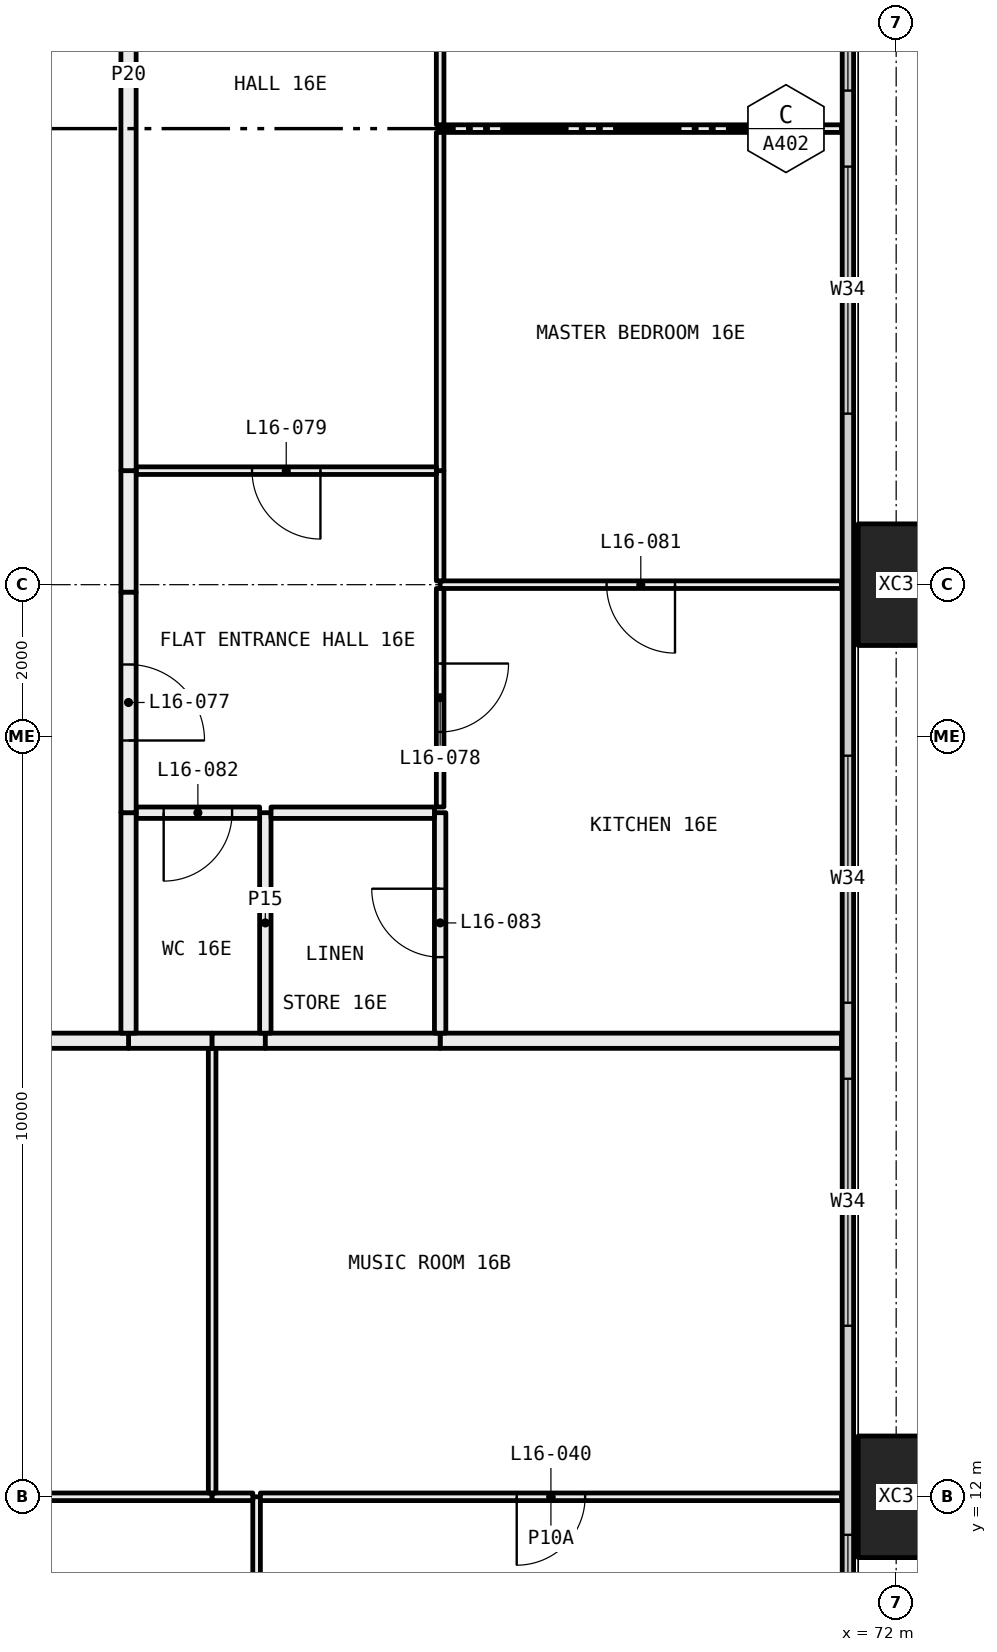
"""IFC4 building model, lengths in metres.
Left out: names, types, materials, properties, quantities, classifications, styles, units other than length and angle.
Written with IfcOpenShell. Run it as: python <this file> out.ifc"""

import sys

from ifc_helpers import new_model, si_unit, direction, frame, frame_2d, origin, origin_2d, place, context, subcontext, project, spatial, rectangle, hollow_rectangle, extrude, element, fill, save


model = new_model("IFC4")
c1 = context("Model", 3, precision=1e-05, world=origin(), true_north=direction((0.0, 1.0)))
c2 = subcontext(c1, "Body", "Model", "MODEL_VIEW")
j1 = project(units=[si_unit("LENGTHUNIT", "METRE"), si_unit("PLANEANGLEUNIT", "RADIAN")], contexts=[c1])
p1 = place(None, origin())
s1 = spatial("IfcSite", under=j1, at=p1, CompositionType="ELEMENT")
p2 = place(p1, origin())
s2 = spatial("IfcBuilding", under=s1, at=p2, CompositionType="ELEMENT")
p3 = place(p2, frame((0.0, 0.0, 67.95)))
s3 = spatial("IfcBuildingStorey", under=s2, at=p3, CompositionType="ELEMENT", Elevation=67.95)
for number, where, z_axis, x_axis in (
    (1, (72.0, 12.0, -0.4), (0.0, 0.0, 1.0), (0.0, 1.0, 0.0)),
    (2, (72.0, 24.0, -0.4), (0.0, 0.0, 1.0), (0.0, 1.0, 0.0)),
):
    element("IfcColumn", number, at=place(p3, frame(where, z_axis=z_axis, x_axis=x_axis)), inside=s3, PredefinedType="COLUMN", context=c2, shape_type="SweptSolid", body=[
        extrude(hollow_rectangle(XDim=1.6, YDim=1.0, WallThickness=0.065, at=origin_2d()), origin(), (0.0, 0.0, 1.0), 3.45),
    ])
p4 = place(p3, frame((71.365, 6.71, 0.0), z_axis=(0.0, 0.0, 1.0), x_axis=(0.0, 1.0, 0.0)))
e3 = element("IfcWall", 3, at=p4, inside=s3, PredefinedType="ELEMENTEDWALL", context=c2, shape_type="SweptSolid", body=[
    extrude(rectangle(XDim=34.58, YDim=0.15, at=frame_2d((17.29, 0.0))), origin(), (0.0, 0.0, 1.0), 3.05),
])
p5 = place(p4, frame((0.29, 0.0, 0.45)))
e4 = element("IfcOpeningElement", 4, at=p5, cuts=e3, PredefinedType="OPENING", context=c2, shape_type="SweptSolid", body=[
    extrude(rectangle(XDim=4.5, YDim=2.55, at=frame_2d((2.25, 1.275))), frame((0.0, 0.085, 0.0), z_axis=(0.0, -1.0, 0.0), x_axis=(1.0, 0.0, 0.0)), (0.0, 0.0, 1.0), 0.17),
])
p6 = place(p4, frame((7.54, 0.0, 0.45)))
e5 = element("IfcOpeningElement", 5, at=p6, cuts=e3, PredefinedType="OPENING", context=c2, shape_type="SweptSolid", body=[
    extrude(rectangle(XDim=3.25, YDim=2.55, at=frame_2d((1.625, 1.275))), frame((0.0, 0.085, 0.0), z_axis=(0.0, -1.0, 0.0), x_axis=(1.0, 0.0, 0.0)), (0.0, 0.0, 1.0), 0.17),
])
p7 = place(p4, frame((11.79, 0.0, 0.45)))
e6 = element("IfcOpeningElement", 6, at=p7, cuts=e3, PredefinedType="OPENING", context=c2, shape_type="SweptSolid", body=[
    extrude(rectangle(XDim=3.25, YDim=2.55, at=frame_2d((1.625, 1.275))), frame((0.0, 0.085, 0.0), z_axis=(0.0, -1.0, 0.0), x_axis=(1.0, 0.0, 0.0)), (0.0, 0.0, 1.0), 0.17),
])
p8 = place(p4, frame((19.54, 0.0, 0.45)))
e7 = element("IfcOpeningElement", 7, at=p8, cuts=e3, PredefinedType="OPENING", context=c2, shape_type="SweptSolid", body=[
    extrude(rectangle(XDim=3.25, YDim=2.55, at=frame_2d((1.625, 1.275))), frame((0.0, 0.085, 0.0), z_axis=(0.0, -1.0, 0.0), x_axis=(1.0, 0.0, 0.0)), (0.0, 0.0, 1.0), 0.17),
])
p9 = place(p4, frame((23.79, 0.0, 0.45)))
e8 = element("IfcOpeningElement", 8, at=p9, cuts=e3, PredefinedType="OPENING", context=c2, shape_type="SweptSolid", body=[
    extrude(rectangle(XDim=2.0, YDim=2.55, at=frame_2d((1.0, 1.275))), frame((0.0, 0.085, 0.0), z_axis=(0.0, -1.0, 0.0), x_axis=(1.0, 0.0, 0.0)), (0.0, 0.0, 1.0), 0.17),
])
p10 = place(p4, frame((29.79, 0.0, 0.45)))
e9 = element("IfcOpeningElement", 9, at=p10, cuts=e3, PredefinedType="OPENING", context=c2, shape_type="SweptSolid", body=[
    extrude(rectangle(XDim=4.5, YDim=2.55, at=frame_2d((2.25, 1.275))), frame((0.0, 0.085, 0.0), z_axis=(0.0, -1.0, 0.0), x_axis=(1.0, 0.0, 0.0)), (0.0, 0.0, 1.0), 0.17),
])
p11 = place(p3, frame((63.585, 6.05, 0.0), z_axis=(0.0, 0.0, 1.0), x_axis=(0.0, 1.0, 0.0)))
e10 = element("IfcWall", 10, at=p11, inside=s3, PredefinedType="PARTITIONING", context=c2, shape_type="SweptSolid", body=[
    extrude(rectangle(XDim=5.95, YDim=0.1, at=frame_2d((2.975, 0.0))), origin(), (0.0, 0.0, 1.0), 2.45),
])
p12 = place(p11, frame((2.525, 0.0, 0.0)))
e11 = element("IfcOpeningElement", 11, at=p12, cuts=e10, PredefinedType="OPENING", context=c2, shape_type="SweptSolid", body=[
    extrude(rectangle(XDim=0.9, YDim=2.1, at=frame_2d((0.45, 1.05))), frame((0.0, 0.06, 0.0), z_axis=(0.0, -1.0, 0.0), x_axis=(1.0, 0.0, 0.0)), (0.0, 0.0, 1.0), 0.12),
])
p13 = place(p3, frame((63.0, 12.0, 0.0), z_axis=(0.0, 0.0, 1.0), x_axis=(-1.0, 0.0, 0.0)))
e12 = element("IfcWall", 12, at=p13, inside=s3, PredefinedType="PARTITIONING", context=c2, shape_type="SweptSolid", body=[
    extrude(rectangle(XDim=2.2, YDim=0.1, at=frame_2d((1.1, 0.0))), origin(), (0.0, 0.0, 1.0), 2.45),
])
p14 = place(p3, frame((63.535, 12.0, 0.0), z_axis=(0.0, 0.0, 1.0), x_axis=(-1.0, 0.0, 0.0)))
e13 = element("IfcWall", 13, at=p14, inside=s3, PredefinedType="PARTITIONING", context=c2, shape_type="SweptSolid", body=[
    extrude(rectangle(XDim=0.535, YDim=0.1, at=frame_2d((0.268, 0.0))), origin(), (0.0, 0.0, 1.0), 2.45),
])
p15 = place(p3, frame((71.28, 12.0, 0.0), z_axis=(0.0, 0.0, 1.0), x_axis=(-1.0, 0.0, 0.0)))
e14 = element("IfcWall", 14, at=p15, inside=s3, PredefinedType="PARTITIONING", context=c2, shape_type="SweptSolid", body=[
    extrude(rectangle(XDim=7.645, YDim=0.1, at=frame_2d((3.823, 0.0))), origin(), (0.0, 0.0, 1.0), 2.45),
])
p16 = place(p15, frame((3.373, 0.0, 0.0)))
e15 = element("IfcOpeningElement", 15, at=p16, cuts=e14, PredefinedType="OPENING", context=c2, shape_type="SweptSolid", body=[
    extrude(rectangle(XDim=0.9, YDim=2.1, at=frame_2d((0.45, 1.05))), frame((0.0, 0.06, 0.0), z_axis=(0.0, -1.0, 0.0), x_axis=(1.0, 0.0, 0.0)), (0.0, 0.0, 1.0), 0.12),
])
p17 = place(p3, frame((63.0, 12.05, 0.0), z_axis=(0.0, 0.0, 1.0), x_axis=(0.0, 1.0, 0.0)))
e16 = element("IfcWall", 16, at=p17, inside=s3, PredefinedType="PARTITIONING", context=c2, shape_type="SweptSolid", body=[
    extrude(rectangle(XDim=5.85, YDim=0.1, at=frame_2d((2.925, 0.0))), origin(), (0.0, 0.0, 1.0), 2.45),
])
p18 = place(p3, frame((63.0, 18.0, 0.0), z_axis=(0.0, 0.0, 1.0), x_axis=(-1.0, 0.0, 0.0)))
e17 = element("IfcWall", 17, at=p18, inside=s3, PredefinedType="PARTITIONING", context=c2, shape_type="SweptSolid", body=[
    extrude(rectangle(XDim=1.1, YDim=0.2, at=frame_2d((0.55, 0.0))), origin(), (0.0, 0.0, 1.0), 3.05),
])
p19 = place(p3, frame((61.9, 18.0, 0.0), z_axis=(0.0, 0.0, 1.0), x_axis=(-1.0, 0.0, 0.0)))
e18 = element("IfcWall", 18, at=p19, inside=s3, PredefinedType="PARTITIONING", context=c2, shape_type="SweptSolid", body=[
    extrude(rectangle(XDim=7.9, YDim=0.2, at=frame_2d((3.95, 0.0))), origin(), (0.0, 0.0, 1.0), 3.05),
])
p20 = place(p3, frame((71.28, 18.0, 0.0), z_axis=(0.0, 0.0, 1.0), x_axis=(-1.0, 0.0, 0.0)))
e19 = element("IfcWall", 19, at=p20, inside=s3, PredefinedType="PARTITIONING", context=c2, shape_type="SweptSolid", body=[
    extrude(rectangle(XDim=5.28, YDim=0.2, at=frame_2d((2.64, 0.0))), origin(), (0.0, 0.0, 1.0), 3.05),
])
p21 = place(p3, frame((63.7, 18.0, 0.0), z_axis=(0.0, 0.0, 1.0), x_axis=(-1.0, 0.0, 0.0)))
e20 = element("IfcWall", 20, at=p21, inside=s3, PredefinedType="PARTITIONING", context=c2, shape_type="SweptSolid", body=[
    extrude(rectangle(XDim=0.7, YDim=0.2, at=frame_2d((0.35, 0.0))), origin(), (0.0, 0.0, 1.0), 3.05),
])
p22 = place(p3, frame((66.0, 18.0, 0.0), z_axis=(0.0, 0.0, 1.0), x_axis=(-1.0, 0.0, 0.0)))
e21 = element("IfcWall", 21, at=p22, inside=s3, PredefinedType="PARTITIONING", context=c2, shape_type="SweptSolid", body=[
    extrude(rectangle(XDim=2.3, YDim=0.2, at=frame_2d((1.15, 0.0))), origin(), (0.0, 0.0, 1.0), 3.05),
])
p23 = place(p3, frame((71.28, 24.0, 0.0), z_axis=(0.0, 0.0, 1.0), x_axis=(-1.0, 0.0, 0.0)))
e22 = element("IfcWall", 22, at=p23, inside=s3, PredefinedType="PARTITIONING", context=c2, shape_type="SweptSolid", body=[
    extrude(rectangle(XDim=5.28, YDim=0.1, at=frame_2d((2.64, 0.0))), origin(), (0.0, 0.0, 1.0), 2.45),
])
p24 = place(p23, frame((2.19, 0.0, 0.0)))
e23 = element("IfcOpeningElement", 23, at=p24, cuts=e22, PredefinedType="OPENING", context=c2, shape_type="SweptSolid", body=[
    extrude(rectangle(XDim=0.9, YDim=2.1, at=frame_2d((0.45, 1.05))), frame((0.0, 0.06, 0.0), z_axis=(0.0, -1.0, 0.0), x_axis=(1.0, 0.0, 0.0)), (0.0, 0.0, 1.0), 0.12),
])
p25 = place(p3, frame((66.0, 21.0, 0.0), z_axis=(0.0, 0.0, 1.0), x_axis=(0.0, -1.0, 0.0)))
e24 = element("IfcWall", 24, at=p25, inside=s3, PredefinedType="PARTITIONING", context=c2, shape_type="SweptSolid", body=[
    extrude(rectangle(XDim=2.9, YDim=0.15, at=frame_2d((1.45, 0.0))), origin(), (0.0, 0.0, 1.0), 3.05),
])
p26 = place(p25, frame((1.0, 0.0, 0.0)))
e25 = element("IfcOpeningElement", 25, at=p26, cuts=e24, PredefinedType="OPENING", context=c2, shape_type="SweptSolid", body=[
    extrude(rectangle(XDim=0.9, YDim=2.1, at=frame_2d((0.45, 1.05))), frame((0.0, 0.085, 0.0), z_axis=(0.0, -1.0, 0.0), x_axis=(1.0, 0.0, 0.0)), (0.0, 0.0, 1.0), 0.17),
])
p27 = place(p3, frame((66.0, 23.95, 0.0), z_axis=(0.0, 0.0, 1.0), x_axis=(0.0, -1.0, 0.0)))
e26 = element("IfcWall", 26, at=p27, inside=s3, PredefinedType="PARTITIONING", context=c2, shape_type="SweptSolid", body=[
    extrude(rectangle(XDim=2.875, YDim=0.1, at=frame_2d((1.438, 0.0))), origin(), (0.0, 0.0, 1.0), 2.45),
])
p28 = place(p27, frame((0.988, 0.0, 0.0)))
e27 = element("IfcOpeningElement", 27, at=p28, cuts=e26, PredefinedType="OPENING", context=c2, shape_type="SweptSolid", body=[
    extrude(rectangle(XDim=0.9, YDim=2.1, at=frame_2d((0.45, 1.05))), frame((0.0, 0.06, 0.0), z_axis=(0.0, -1.0, 0.0), x_axis=(1.0, 0.0, 0.0)), (0.0, 0.0, 1.0), 0.12),
])
p29 = place(p3, frame((71.28, 30.0, 0.0), z_axis=(0.0, 0.0, 1.0), x_axis=(-1.0, 0.0, 0.0)))
e28 = element("IfcWall", 28, at=p29, inside=s3, PredefinedType="PARTITIONING", context=c2, shape_type="SweptSolid", body=[
    extrude(rectangle(XDim=5.28, YDim=0.1, at=frame_2d((2.64, 0.0))), origin(), (0.0, 0.0, 1.0), 3.05),
])
p30 = place(p3, frame((66.0, 25.5, 0.0), z_axis=(0.0, 0.0, 1.0), x_axis=(0.0, -1.0, 0.0)))
e29 = element("IfcWall", 29, at=p30, inside=s3, PredefinedType="PARTITIONING", context=c2, shape_type="SweptSolid", body=[
    extrude(rectangle(XDim=1.45, YDim=0.1, at=frame_2d((0.725, 0.0))), origin(), (0.0, 0.0, 1.0), 2.45),
])
p31 = place(p3, frame((66.0, 29.95, 0.0), z_axis=(0.0, 0.0, 1.0), x_axis=(0.0, -1.0, 0.0)))
e30 = element("IfcWall", 30, at=p31, inside=s3, PredefinedType="PARTITIONING", context=c2, shape_type="SweptSolid", body=[
    extrude(rectangle(XDim=4.45, YDim=0.1, at=frame_2d((2.225, 0.0))), origin(), (0.0, 0.0, 1.0), 3.05),
])
p32 = place(p3, frame((66.0, 35.9, 0.0), z_axis=(0.0, 0.0, 1.0), x_axis=(0.0, -1.0, 0.0)))
e31 = element("IfcWall", 31, at=p32, inside=s3, PredefinedType="PARTITIONING", context=c2, shape_type="SweptSolid", body=[
    extrude(rectangle(XDim=5.85, YDim=0.1, at=frame_2d((2.925, 0.0))), origin(), (0.0, 0.0, 1.0), 3.05),
])
p33 = place(p32, frame((2.475, 0.0, 0.0)))
e32 = element("IfcOpeningElement", 32, at=p33, cuts=e31, PredefinedType="OPENING", context=c2, shape_type="SweptSolid", body=[
    extrude(rectangle(XDim=0.9, YDim=2.1, at=frame_2d((0.45, 1.05))), frame((0.0, 0.06, 0.0), z_axis=(0.0, -1.0, 0.0), x_axis=(1.0, 0.0, 0.0)), (0.0, 0.0, 1.0), 0.12),
])
p34 = place(p3, frame((63.7, 18.1, 0.0), z_axis=(0.0, 0.0, 1.0), x_axis=(0.0, 1.0, 0.0)))
e33 = element("IfcWall", 33, at=p34, inside=s3, PredefinedType="PARTITIONING", context=c2, shape_type="SweptSolid", body=[
    extrude(rectangle(XDim=2.9, YDim=0.15, at=frame_2d((1.45, 0.0))), origin(), (0.0, 0.0, 1.0), 3.05),
])
p35 = place(p3, frame((63.625, 21.0, 0.0), z_axis=(0.0, 0.0, 1.0), x_axis=(-1.0, 0.0, 0.0)))
e34 = element("IfcWall", 34, at=p35, inside=s3, PredefinedType="PARTITIONING", context=c2, shape_type="SweptSolid", body=[
    extrude(rectangle(XDim=1.625, YDim=0.15, at=frame_2d((0.812, 0.0))), origin(), (0.0, 0.0, 1.0), 3.05),
])
p36 = place(p35, frame((0.363, 0.0, 0.0)))
e35 = element("IfcOpeningElement", 35, at=p36, cuts=e34, PredefinedType="OPENING", context=c2, shape_type="SweptSolid", body=[
    extrude(rectangle(XDim=0.9, YDim=2.1, at=frame_2d((0.45, 1.05))), frame((0.0, 0.085, 0.0), z_axis=(0.0, -1.0, 0.0), x_axis=(1.0, 0.0, 0.0)), (0.0, 0.0, 1.0), 0.17),
])
p37 = place(p3, frame((61.9, 21.0, 0.0), z_axis=(0.0, 0.0, 1.0), x_axis=(0.0, -1.0, 0.0)))
e36 = element("IfcWall", 36, at=p37, inside=s3, PredefinedType="PARTITIONING", context=c2, shape_type="SweptSolid", body=[
    extrude(rectangle(XDim=2.9, YDim=0.2, at=frame_2d((1.45, 0.0))), origin(), (0.0, 0.0, 1.0), 3.05),
])
p38 = place(p3, frame((65.925, 21.0, 0.0), z_axis=(0.0, 0.0, 1.0), x_axis=(-1.0, 0.0, 0.0)))
e37 = element("IfcWall", 37, at=p38, inside=s3, PredefinedType="PARTITIONING", context=c2, shape_type="SweptSolid", body=[
    extrude(rectangle(XDim=2.15, YDim=0.15, at=frame_2d((1.075, 0.0))), origin(), (0.0, 0.0, 1.0), 3.05),
])
p39 = place(p3, frame((65.95, 25.5, 0.0), z_axis=(0.0, 0.0, 1.0), x_axis=(-1.0, 0.0, 0.0)))
e38 = element("IfcWall", 38, at=p39, inside=s3, PredefinedType="PARTITIONING", context=c2, shape_type="SweptSolid", body=[
    extrude(rectangle(XDim=3.95, YDim=0.1, at=frame_2d((1.975, 0.0))), origin(), (0.0, 0.0, 1.0), 3.05),
])
p40 = place(p39, frame((1.525, 0.0, 0.0)))
e39 = element("IfcOpeningElement", 39, at=p40, cuts=e38, PredefinedType="OPENING", context=c2, shape_type="SweptSolid", body=[
    extrude(rectangle(XDim=0.9, YDim=2.1, at=frame_2d((0.45, 1.05))), frame((0.0, 0.06, 0.0), z_axis=(0.0, -1.0, 0.0), x_axis=(1.0, 0.0, 0.0)), (0.0, 0.0, 1.0), 0.12),
])
p41 = place(p3, frame((61.9, 25.5, 0.0), z_axis=(0.0, 0.0, 1.0), x_axis=(0.0, -1.0, 0.0)))
e40 = element("IfcWall", 40, at=p41, inside=s3, PredefinedType="PARTITIONING", context=c2, shape_type="SweptSolid", body=[
    extrude(rectangle(XDim=1.6, YDim=0.2, at=frame_2d((0.8, 0.0))), origin(), (0.0, 0.0, 1.0), 2.45),
])
p42 = place(p3, frame((61.9, 23.9, 0.0), z_axis=(0.0, 0.0, 1.0), x_axis=(0.0, -1.0, 0.0)))
e41 = element("IfcWall", 41, at=p42, inside=s3, PredefinedType="PARTITIONING", context=c2, shape_type="SweptSolid", body=[
    extrude(rectangle(XDim=2.9, YDim=0.2, at=frame_2d((1.45, 0.0))), origin(), (0.0, 0.0, 1.0), 3.05),
])
p43 = place(p42, frame((0.95, 0.0, 0.0)))
e42 = element("IfcOpeningElement", 42, at=p43, cuts=e41, PredefinedType="OPENING", context=c2, shape_type="SweptSolid", body=[
    extrude(rectangle(XDim=1.0, YDim=2.1, at=frame_2d((0.5, 1.05))), frame((0.0, 0.11, 0.0), z_axis=(0.0, -1.0, 0.0), x_axis=(1.0, 0.0, 0.0)), (0.0, 0.0, 1.0), 0.22),
])
p44 = place(p3, frame((61.9, 35.9, 0.0), z_axis=(0.0, 0.0, 1.0), x_axis=(0.0, -1.0, 0.0)))
e43 = element("IfcWall", 43, at=p44, inside=s3, PredefinedType="PARTITIONING", context=c2, shape_type="SweptSolid", body=[
    extrude(rectangle(XDim=10.4, YDim=0.2, at=frame_2d((5.2, 0.0))), origin(), (0.0, 0.0, 1.0), 3.05),
])
p45 = place(p5, origin())
e44 = element("IfcWindow", 44, at=p45, inside=s3, PartitioningType="SINGLE_PANEL", PredefinedType="WINDOW", context=c2, shape_type="SweptSolid", body=[
    extrude(rectangle(XDim=4.5, YDim=2.55, at=frame_2d((2.25, 1.275))), frame((0.0, 0.03, 0.0), z_axis=(0.0, -1.0, 0.0), x_axis=(1.0, 0.0, 0.0)), (0.0, 0.0, 1.0), 0.06),
])
fill(e4, e44)
p46 = place(p6, origin())
e45 = element("IfcWindow", 45, at=p46, inside=s3, PartitioningType="SINGLE_PANEL", PredefinedType="WINDOW", context=c2, shape_type="SweptSolid", body=[
    extrude(rectangle(XDim=3.25, YDim=2.55, at=frame_2d((1.625, 1.275))), frame((0.0, 0.03, 0.0), z_axis=(0.0, -1.0, 0.0), x_axis=(1.0, 0.0, 0.0)), (0.0, 0.0, 1.0), 0.06),
])
fill(e5, e45)
p47 = place(p7, origin())
e46 = element("IfcWindow", 46, at=p47, inside=s3, PartitioningType="SINGLE_PANEL", PredefinedType="WINDOW", context=c2, shape_type="SweptSolid", body=[
    extrude(rectangle(XDim=3.25, YDim=2.55, at=frame_2d((1.625, 1.275))), frame((0.0, 0.03, 0.0), z_axis=(0.0, -1.0, 0.0), x_axis=(1.0, 0.0, 0.0)), (0.0, 0.0, 1.0), 0.06),
])
fill(e6, e46)
p48 = place(p8, origin())
e47 = element("IfcWindow", 47, at=p48, inside=s3, PartitioningType="SINGLE_PANEL", PredefinedType="WINDOW", context=c2, shape_type="SweptSolid", body=[
    extrude(rectangle(XDim=3.25, YDim=2.55, at=frame_2d((1.625, 1.275))), frame((0.0, 0.03, 0.0), z_axis=(0.0, -1.0, 0.0), x_axis=(1.0, 0.0, 0.0)), (0.0, 0.0, 1.0), 0.06),
])
fill(e7, e47)
p49 = place(p9, origin())
e48 = element("IfcWindow", 48, at=p49, inside=s3, PartitioningType="SINGLE_PANEL", PredefinedType="WINDOW", context=c2, shape_type="SweptSolid", body=[
    extrude(rectangle(XDim=2.0, YDim=2.55, at=frame_2d((1.0, 1.275))), frame((0.0, 0.03, 0.0), z_axis=(0.0, -1.0, 0.0), x_axis=(1.0, 0.0, 0.0)), (0.0, 0.0, 1.0), 0.06),
])
fill(e8, e48)
p50 = place(p16, origin())
e49 = element("IfcDoor", 49, at=p50, inside=s3, OperationType="SINGLE_SWING_LEFT", PredefinedType="DOOR", context=c2, shape_type="SweptSolid", body=[
    extrude(rectangle(XDim=0.9, YDim=2.1, at=frame_2d((0.45, 1.05))), frame((0.0, 0.025, 0.0), z_axis=(0.0, -1.0, 0.0), x_axis=(1.0, 0.0, 0.0)), (0.0, 0.0, 1.0), 0.05),
])
fill(e15, e49)
p51 = place(p43, origin())
e50 = element("IfcDoor", 50, at=p51, inside=s3, OperationType="SINGLE_SWING_LEFT", PredefinedType="DOOR", context=c2, shape_type="SweptSolid", body=[
    extrude(rectangle(XDim=1.0, YDim=2.1, at=frame_2d((0.5, 1.05))), frame((0.0, 0.025, 0.0), z_axis=(0.0, -1.0, 0.0), x_axis=(1.0, 0.0, 0.0)), (0.0, 0.0, 1.0), 0.05),
])
fill(e42, e50)
p52 = place(p28, origin())
e51 = element("IfcDoor", 51, at=p52, inside=s3, OperationType="SINGLE_SWING_RIGHT", PredefinedType="DOOR", context=c2, shape_type="SweptSolid", body=[
    extrude(rectangle(XDim=0.9, YDim=2.1, at=frame_2d((0.45, 1.05))), frame((0.0, 0.025, 0.0), z_axis=(0.0, -1.0, 0.0), x_axis=(1.0, 0.0, 0.0)), (0.0, 0.0, 1.0), 0.05),
])
fill(e27, e51)
p53 = place(p40, origin())
e52 = element("IfcDoor", 52, at=p53, inside=s3, OperationType="SINGLE_SWING_RIGHT", PredefinedType="DOOR", context=c2, shape_type="SweptSolid", body=[
    extrude(rectangle(XDim=0.9, YDim=2.1, at=frame_2d((0.45, 1.05))), frame((0.0, 0.025, 0.0), z_axis=(0.0, -1.0, 0.0), x_axis=(1.0, 0.0, 0.0)), (0.0, 0.0, 1.0), 0.05),
])
fill(e39, e52)
p54 = place(p24, origin())
e53 = element("IfcDoor", 53, at=p54, inside=s3, OperationType="SINGLE_SWING_RIGHT", PredefinedType="DOOR", context=c2, shape_type="SweptSolid", body=[
    extrude(rectangle(XDim=0.9, YDim=2.1, at=frame_2d((0.45, 1.05))), frame((0.0, 0.025, 0.0), z_axis=(0.0, -1.0, 0.0), x_axis=(1.0, 0.0, 0.0)), (0.0, 0.0, 1.0), 0.05),
])
fill(e23, e53)
p55 = place(p36, origin())
e54 = element("IfcDoor", 54, at=p55, inside=s3, OperationType="SINGLE_SWING_LEFT", PredefinedType="DOOR", context=c2, shape_type="SweptSolid", body=[
    extrude(rectangle(XDim=0.9, YDim=2.1, at=frame_2d((0.45, 1.05))), frame((0.0, 0.025, 0.0), z_axis=(0.0, -1.0, 0.0), x_axis=(1.0, 0.0, 0.0)), (0.0, 0.0, 1.0), 0.05),
])
fill(e35, e54)
p56 = place(p26, frame((0.9, 0.0, 0.0), x_axis=(-1.0, 0.0, 0.0)))
e55 = element("IfcDoor", 55, at=p56, inside=s3, OperationType="SINGLE_SWING_LEFT", PredefinedType="DOOR", context=c2, shape_type="SweptSolid", body=[
    extrude(rectangle(XDim=0.9, YDim=2.1, at=frame_2d((0.45, 1.05))), frame((0.0, 0.025, 0.0), z_axis=(0.0, -1.0, 0.0), x_axis=(1.0, 0.0, 0.0)), (0.0, 0.0, 1.0), 0.05),
])
fill(e25, e55)
save(model, sys.argv[1])
